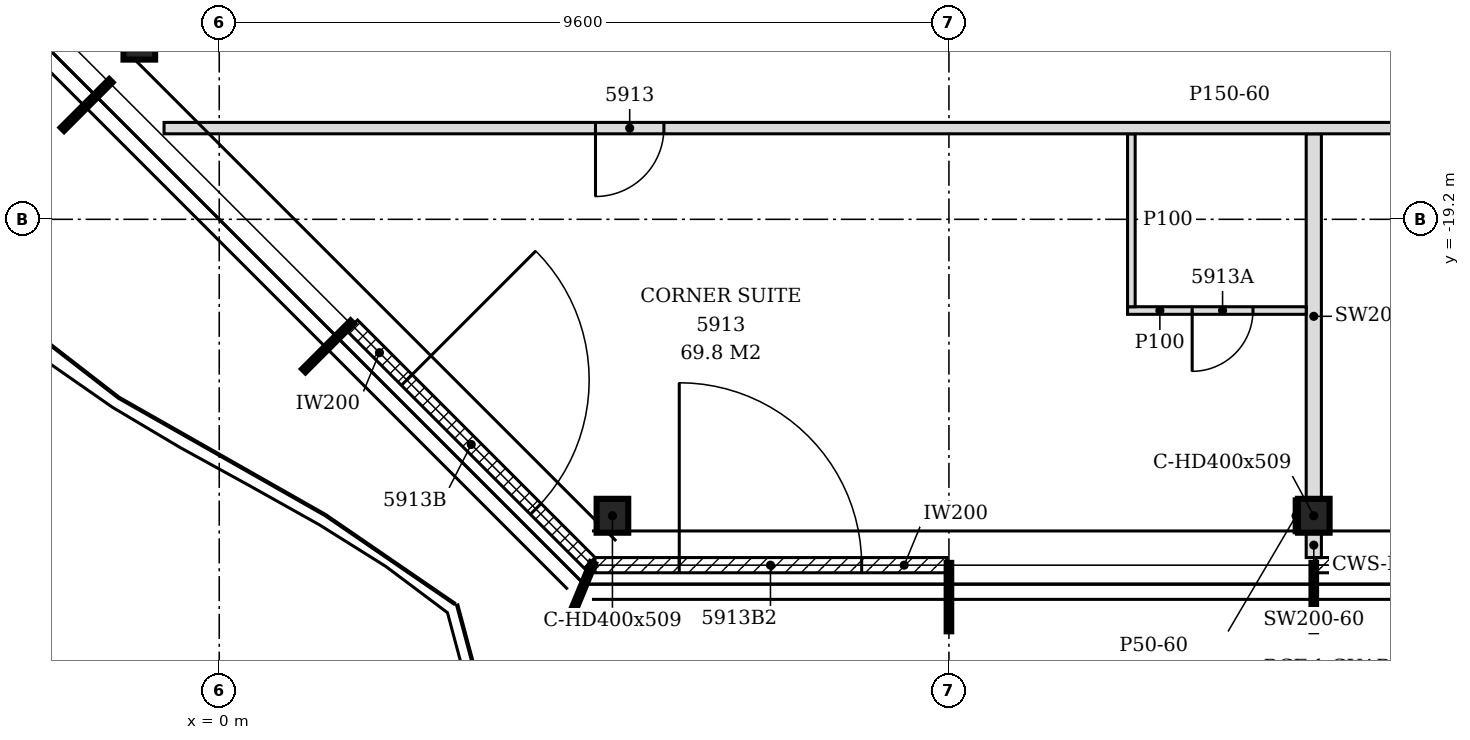
"""IFC4 building model, lengths in metres.
Left out: names, types, materials, properties, quantities, classifications, styles, units other than length and angle.
Written with IfcOpenShell. Run it as: python <this file> out.ifc"""

import sys

from ifc_helpers import new_model, si_unit, direction, frame, frame_2d, origin, origin_2d, place, context, subcontext, project, spatial, polyline, rectangle, i_section, outline, extrude, element, fill, save


model = new_model("IFC4")
c1 = context("Model", 3, precision=1e-05, world=origin(), true_north=direction((0.0, 1.0)))
c2 = subcontext(c1, "Body", "Model", "MODEL_VIEW")
j1 = project(units=[si_unit("LENGTHUNIT", "METRE"), si_unit("PLANEANGLEUNIT", "RADIAN")], contexts=[c1])
p1 = place(None, origin())
s1 = spatial("IfcSite", under=j1, at=p1, CompositionType="ELEMENT")
p2 = place(p1, origin())
s2 = spatial("IfcBuilding", under=s1, at=p2, CompositionType="ELEMENT")
p3 = place(p2, frame((0.0, 0.0, 232.2)))
s3 = spatial("IfcBuildingStorey", under=s2, at=p3, CompositionType="ELEMENT", Elevation=232.2)
for number, where, z_axis, x_axis in (
    (1, (5.173, -23.1, -0.15), (0.0, 0.0, 1.0), (1.0, 0.0, 0.0)),
    (2, (14.4, -23.1, -0.15), (0.0, 0.0, 1.0), (1.0, 0.0, 0.0)),
    (3, (-1.052, -16.876, -0.15), (0.0, 0.0, 1.0), (1.0, 0.0, 0.0)),
):
    element("IfcColumn", number, at=place(p3, frame(where, z_axis=z_axis, x_axis=x_axis)), inside=s3, PredefinedType="COLUMN", context=c2, shape_type="SweptSolid", body=[
        extrude(i_section(OverallWidth=0.416, OverallDepth=0.446, WebThickness=0.039, FlangeThickness=0.063, FilletRadius=0.015, at=origin_2d()), origin(), (0.0, 0.0, 1.0), 3.6),
    ])
p4 = place(p3, frame((4.944, -23.75, 0.0), z_axis=(0.0, 0.0, 1.0), x_axis=(1.0, 0.0, 0.0)))
e4 = element("IfcWall", 4, at=p4, inside=s3, PredefinedType="NOTDEFINED", context=c2, shape_type="SweptSolid", body=[
    extrude(rectangle(XDim=4.626, YDim=0.2, at=frame_2d((2.313, 0.0))), origin(), (0.0, 0.0, 1.0), 3.45),
])
p5 = place(p4, frame((1.108, 0.0, 0.0)))
e5 = element("IfcOpeningElement", 5, at=p5, cuts=e4, PredefinedType="OPENING", context=c2, shape_type="SweptSolid", body=[
    extrude(rectangle(XDim=2.4, YDim=2.4, at=frame_2d((1.2, 1.2))), frame((0.0, 0.11, 0.0), z_axis=(0.0, -1.0, 0.0), x_axis=(1.0, 0.0, 0.0)), (0.0, 0.0, 1.0), 0.22),
])
p6 = place(p3, frame((14.43, -23.75, 0.0), z_axis=(0.0, 0.0, 1.0), x_axis=(1.0, 0.0, 0.0)))
e6 = element("IfcWall", 6, at=p6, inside=s3, PredefinedType="NOTDEFINED", context=c2, shape_type="SweptSolid", body=[
    extrude(rectangle(XDim=4.74, YDim=0.2, at=frame_2d((2.37, 0.0))), origin(), (0.0, 0.0, 1.0), 3.45),
])
p7 = place(p6, frame((1.17, 0.0, 0.0)))
e7 = element("IfcOpeningElement", 7, at=p7, cuts=e6, PredefinedType="OPENING", context=c2, shape_type="SweptSolid", body=[
    extrude(rectangle(XDim=2.4, YDim=2.4, at=frame_2d((1.2, 1.2))), frame((0.0, 0.11, 0.0), z_axis=(0.0, -1.0, 0.0), x_axis=(1.0, 0.0, 0.0)), (0.0, 0.0, 1.0), 0.22),
])
p8 = place(p3, frame((1.749, -20.596, 0.0), z_axis=(0.0, 0.0, 1.0), x_axis=(0.707106781187, -0.707106781187, 0.0)))
e8 = element("IfcWall", 8, at=p8, inside=s3, PredefinedType="NOTDEFINED", context=c2, shape_type="SweptSolid", body=[
    extrude(rectangle(XDim=4.421, YDim=0.2, at=frame_2d((2.21, 0.0))), origin(), (0.0, 0.0, 1.0), 3.45),
])
p9 = place(p8, frame((1.015, 0.0, 0.0)))
e9 = element("IfcOpeningElement", 9, at=p9, cuts=e8, PredefinedType="OPENING", context=c2, shape_type="SweptSolid", body=[
    extrude(rectangle(XDim=2.4, YDim=2.4, at=frame_2d((1.2, 1.2))), frame((0.0, 0.11, 0.0), z_axis=(0.0, -1.0, 0.0), x_axis=(1.0, 0.0, 0.0)), (0.0, 0.0, 1.0), 0.22),
])
p10 = place(p3, frame((14.4, -23.65, 0.0), z_axis=(0.0, 0.0, 1.0), x_axis=(0.0, 1.0, 0.0)))
e10 = element("IfcWall", 10, at=p10, inside=s3, PredefinedType="PARTITIONING", context=c2, shape_type="SweptSolid", body=[
    extrude(rectangle(XDim=0.327, YDim=0.2, at=frame_2d((0.164, 0.0))), origin(), (0.0, 0.0, 1.0), 3.45),
])
p11 = place(p3, frame((14.4, -22.877, 0.0), z_axis=(0.0, 0.0, 1.0), x_axis=(0.0, 1.0, 0.0)))
e11 = element("IfcWall", 11, at=p11, inside=s3, PredefinedType="PARTITIONING", context=c2, shape_type="SweptSolid", body=[
    extrude(outline(polyline([(0.0, 0.0), (4.802, 0.0), (4.802, 3.45), (3.782, 3.45), (3.78, 2.88), (3.572, 2.88), (3.57, 3.45), (0.0, 3.45), (0.0, 0.0)])), frame((0.0, 0.1, 0.0), z_axis=(0.0, -1.0, 0.0), x_axis=(1.0, 0.0, 0.0)), (0.0, 0.0, 1.0), 0.2),
])
p12 = place(p3, frame((11.95, -20.4, 0.0), z_axis=(0.0, 0.0, 1.0), x_axis=(1.0, 0.0, 0.0)))
e12 = element("IfcWall", 12, at=p12, inside=s3, PredefinedType="PARTITIONING", context=c2, shape_type="SweptSolid", body=[
    extrude(rectangle(XDim=2.35, YDim=0.1, at=frame_2d((1.175, 0.0))), origin(), (0.0, 0.0, 1.0), 3.45),
])
p13 = place(p12, frame((0.85, 0.0, 0.0)))
e13 = element("IfcOpeningElement", 13, at=p13, cuts=e12, PredefinedType="OPENING", context=c2, shape_type="SweptSolid", body=[
    extrude(rectangle(XDim=0.8, YDim=2.1, at=frame_2d((0.4, 1.05))), frame((0.0, 0.06, 0.0), z_axis=(0.0, -1.0, 0.0), x_axis=(1.0, 0.0, 0.0)), (0.0, 0.0, 1.0), 0.12),
])
p14 = place(p3, frame((12.0, -20.35, 0.0), z_axis=(0.0, 0.0, 1.0), x_axis=(0.0, 1.0, 0.0)))
e14 = element("IfcWall", 14, at=p14, inside=s3, PredefinedType="PARTITIONING", context=c2, shape_type="SweptSolid", body=[
    extrude(outline(polyline([(0.0, 0.0), (2.275, 0.0), (2.275, 3.45), (1.255, 3.45), (1.253, 2.88), (1.045, 2.88), (1.043, 3.45), (0.0, 3.45), (0.0, 0.0)])), frame((0.0, 0.05, 0.0), z_axis=(0.0, -1.0, 0.0), x_axis=(1.0, 0.0, 0.0)), (0.0, 0.0, 1.0), 0.1),
])
p15 = place(p3, frame((-0.726, -18.0, 0.0), z_axis=(0.0, 0.0, 1.0), x_axis=(1.0, 0.0, 0.0)))
e15 = element("IfcWall", 15, at=p15, inside=s3, PredefinedType="PARTITIONING", context=c2, shape_type="SweptSolid", body=[
    extrude(outline(polyline([(0.0, 0.0), (22.347, 0.0), (22.347, 3.45), (20.076, 3.45), (20.074, 2.73), (19.776, 2.73), (19.774, 3.45), (8.076, 3.45), (8.074, 2.73), (7.776, 2.73), (7.774, 3.45), (1.086, 3.45), (1.084, 2.93), (0.512, 2.93), (0.51, 3.45), (0.0, 3.45), (0.0, 0.0)])), frame((0.0, 0.075, 0.0), z_axis=(0.0, -1.0, 0.0), x_axis=(1.0, 0.0, 0.0)), (0.0, 0.0, 1.0), 0.15),
])
p16 = place(p15, frame((5.676, 0.0, 0.0)))
e16 = element("IfcOpeningElement", 16, at=p16, cuts=e15, PredefinedType="OPENING", context=c2, shape_type="SweptSolid", body=[
    extrude(rectangle(XDim=0.9, YDim=2.1, at=frame_2d((0.45, 1.05))), frame((0.0, 0.085, 0.0), z_axis=(0.0, -1.0, 0.0), x_axis=(1.0, 0.0, 0.0)), (0.0, 0.0, 1.0), 0.17),
])
p17 = place(p3, frame((14.167, -23.323, 0.0), z_axis=(0.0, 0.0, 1.0), x_axis=(0.0, 1.0, 0.0)))
e17 = element("IfcWall", 17, at=p17, inside=s3, PredefinedType="PARTITIONING", context=c2, shape_type="SweptSolid", body=[
    extrude(rectangle(XDim=0.446, YDim=0.05, at=frame_2d((0.223, 0.0))), origin(), (0.0, 0.0, 1.0), 2.93),
])
p18 = place(p5, origin())
e18 = element("IfcDoor", 18, at=p18, inside=s3, OperationType="SINGLE_SWING_LEFT", PredefinedType="DOOR", context=c2, shape_type="SweptSolid", body=[
    extrude(rectangle(XDim=2.4, YDim=2.4, at=frame_2d((1.2, 1.2))), frame((0.0, 0.025, 0.0), z_axis=(0.0, -1.0, 0.0), x_axis=(1.0, 0.0, 0.0)), (0.0, 0.0, 1.0), 0.05),
])
fill(e5, e18)
p19 = place(p9, origin())
e19 = element("IfcDoor", 19, at=p19, inside=s3, OperationType="SINGLE_SWING_LEFT", PredefinedType="DOOR", context=c2, shape_type="SweptSolid", body=[
    extrude(rectangle(XDim=2.4, YDim=2.4, at=frame_2d((1.2, 1.2))), frame((0.0, 0.025, 0.0), z_axis=(0.0, -1.0, 0.0), x_axis=(1.0, 0.0, 0.0)), (0.0, 0.0, 1.0), 0.05),
])
fill(e9, e19)
p20 = place(p16, frame((0.9, 0.0, 0.0), z_axis=(0.0, 0.0, 1.0), x_axis=(-1.0, 0.0, 0.0)))
e20 = element("IfcDoor", 20, at=p20, inside=s3, OperationType="SINGLE_SWING_RIGHT", PredefinedType="DOOR", context=c2, shape_type="SweptSolid", body=[
    extrude(rectangle(XDim=0.9, YDim=2.1, at=frame_2d((0.45, 1.05))), frame((0.0, 0.025, 0.0), z_axis=(0.0, -1.0, 0.0), x_axis=(1.0, 0.0, 0.0)), (0.0, 0.0, 1.0), 0.05),
])
fill(e16, e20)
p21 = place(p13, frame((0.8, 0.0, 0.0), z_axis=(0.0, 0.0, 1.0), x_axis=(-1.0, 0.0, 0.0)))
e21 = element("IfcDoor", 21, at=p21, inside=s3, OperationType="SINGLE_SWING_RIGHT", PredefinedType="DOOR", context=c2, shape_type="SweptSolid", body=[
    extrude(rectangle(XDim=0.8, YDim=2.1, at=frame_2d((0.4, 1.05))), frame((0.0, 0.025, 0.0), z_axis=(0.0, -1.0, 0.0), x_axis=(1.0, 0.0, 0.0)), (0.0, 0.0, 1.0), 0.05),
])
fill(e13, e21)
save(model, sys.argv[1])
